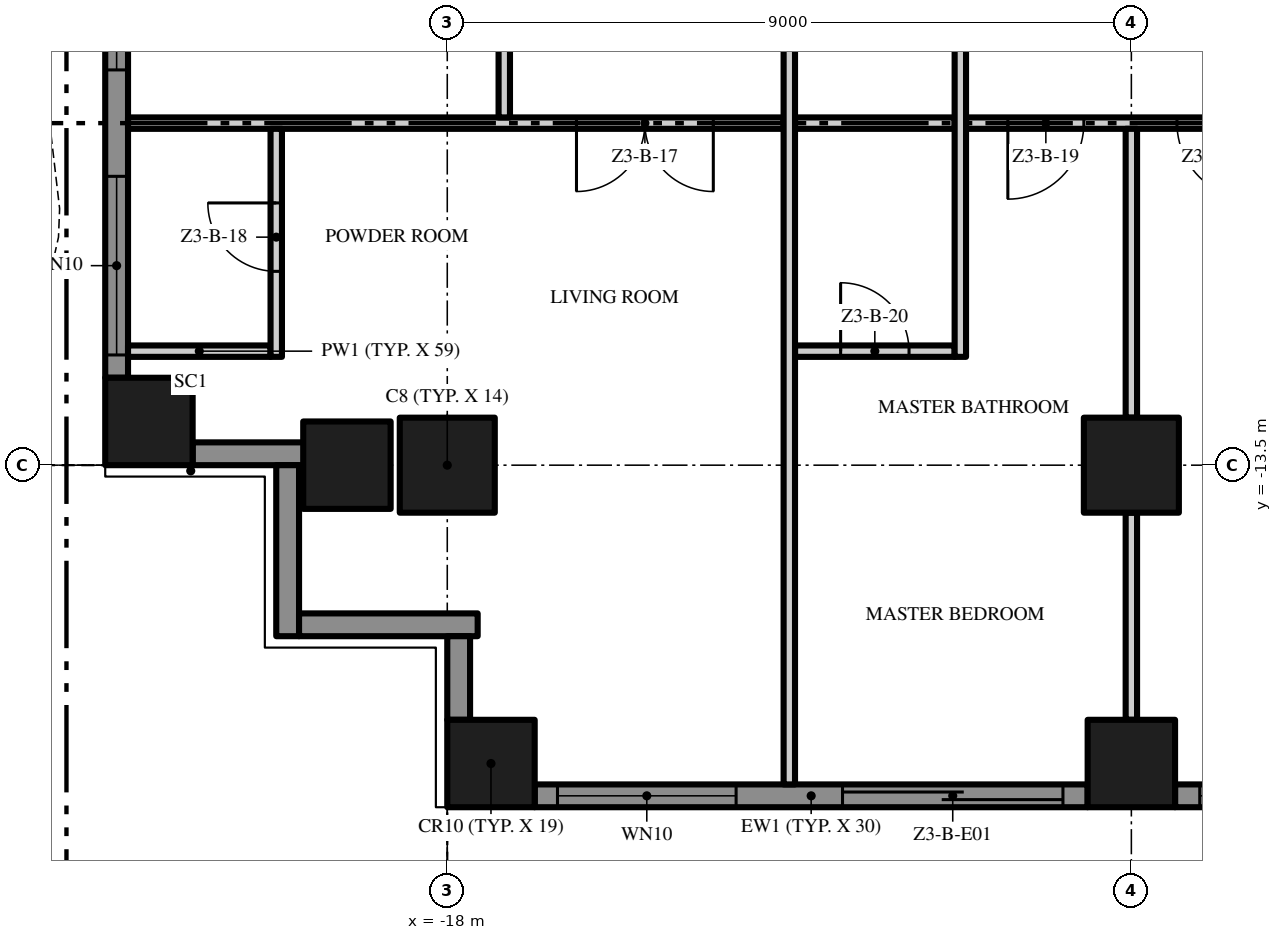
"""IFC4 building model, lengths in metres.
Left out: names, types, materials, properties, quantities, classifications, styles, units other than length and angle.
Written with IfcOpenShell. Run it as: python <this file> out.ifc"""

import sys

from ifc_helpers import new_model, si_unit, direction, frame, frame_2d, origin, origin_2d, place, context, subcontext, project, spatial, polyline, rectangle, outline, extrude, element, fill, save


model = new_model("IFC4")
c1 = context("Model", 3, precision=1e-05, world=origin(), true_north=direction((0.0, 1.0)))
c2 = subcontext(c1, "Body", "Model", "MODEL_VIEW")
j1 = project(units=[si_unit("LENGTHUNIT", "METRE"), si_unit("PLANEANGLEUNIT", "RADIAN")], contexts=[c1])
p1 = place(None, origin())
s1 = spatial("IfcSite", under=j1, at=p1, CompositionType="ELEMENT")
p2 = place(p1, origin())
s2 = spatial("IfcBuilding", under=s1, at=p2, CompositionType="ELEMENT")
p3 = place(p2, frame((0.0, 0.0, 140.2)))
s3 = spatial("IfcBuildingStorey", under=s2, at=p3, CompositionType="ELEMENT", Elevation=140.2)
p4 = place(p3, frame((-18.0, -13.5, 0.0), z_axis=(0.0, 0.0, 1.0), x_axis=(1.0, 0.0, 0.0)))
e1 = element("IfcColumn", 1, at=p4, inside=s3, PredefinedType="COLUMN", context=c2, shape_type="SweptSolid", body=[
    extrude(rectangle(XDim=1.25, YDim=1.25, at=origin_2d()), origin(), (0.0, 0.0, 1.0), 3.5),
])
for number, where, z_axis, x_axis in (
    (2, (-17.425, -17.425, 0.0), (0.0, 0.0, 1.0), (1.0, 0.0, 0.0)),
    (3, (-21.925, -12.925, 0.0), (0.0, 0.0, 1.0), (1.0, 0.0, 0.0)),
    (4, (-19.32, -13.5, 0.0), (0.0, 0.0, 1.0), (1.0, 0.0, 0.0)),
):
    element("IfcColumn", number, at=place(p3, frame(where, z_axis=z_axis, x_axis=x_axis)), inside=s3, PredefinedType="COLUMN", context=c2, shape_type="SweptSolid", body=[
        extrude(rectangle(XDim=1.15, YDim=1.15, at=origin_2d()), origin(), (0.0, 0.0, 1.0), 3.5),
    ])
p5 = place(p3, frame((-9.0, -13.5, 0.0), z_axis=(0.0, 0.0, 1.0), x_axis=(1.0, 0.0, 0.0)))
e5 = element("IfcColumn", 5, at=p5, inside=s3, PredefinedType="COLUMN", context=c2, shape_type="SweptSolid", body=[
    extrude(rectangle(XDim=1.25, YDim=1.25, at=origin_2d()), origin(), (0.0, 0.0, 1.0), 3.5),
])
p6 = place(p3, frame((-9.0, -17.425, 0.0), z_axis=(0.0, 0.0, 1.0), x_axis=(1.0, 0.0, 0.0)))
e6 = element("IfcColumn", 6, at=p6, inside=s3, PredefinedType="COLUMN", context=c2, shape_type="SweptSolid", body=[
    extrude(rectangle(XDim=1.15, YDim=1.15, at=origin_2d()), origin(), (0.0, 0.0, 1.0), 3.5),
])
p7 = place(p3, frame((-9.575, -17.85, 0.0), z_axis=(0.0, 0.0, 1.0), x_axis=(-1.0, 0.0, 0.0)))
e7 = element("IfcWall", 7, at=p7, inside=s3, PredefinedType="SOLIDWALL", context=c2, shape_type="SweptSolid", body=[
    extrude(rectangle(XDim=7.275, YDim=0.3, at=frame_2d((3.638, 0.0))), origin(), (0.0, 0.0, 1.0), 3.5),
])
p8 = place(p7, frame((4.625, 0.0, 0.45)))
e8 = element("IfcOpeningElement", 8, at=p8, cuts=e7, PredefinedType="OPENING", context=c2, shape_type="SweptSolid", body=[
    extrude(rectangle(XDim=2.35, YDim=2.65, at=frame_2d((1.175, 1.325))), frame((0.0, 0.16, 0.0), z_axis=(0.0, -1.0, 0.0), x_axis=(1.0, 0.0, 0.0)), (0.0, 0.0, 1.0), 0.32),
])
p9 = place(p7, frame((0.325, 0.0, 0.0)))
e9 = element("IfcOpeningElement", 9, at=p9, cuts=e7, PredefinedType="OPENING", context=c2, shape_type="SweptSolid", body=[
    extrude(rectangle(XDim=2.9, YDim=2.4, at=frame_2d((1.45, 1.2))), frame((0.0, 0.16, 0.0), z_axis=(0.0, -1.0, 0.0), x_axis=(1.0, 0.0, 0.0)), (0.0, 0.0, 1.0), 0.32),
])
p10 = place(p3, frame((-0.575, -17.85, 0.0), z_axis=(0.0, 0.0, 1.0), x_axis=(-1.0, 0.0, 0.0)))
e10 = element("IfcWall", 10, at=p10, inside=s3, PredefinedType="SOLIDWALL", context=c2, shape_type="SweptSolid", body=[
    extrude(rectangle(XDim=7.85, YDim=0.3, at=frame_2d((3.925, 0.0))), origin(), (0.0, 0.0, 1.0), 3.5),
])
p11 = place(p10, frame((4.625, 0.0, 0.45)))
e11 = element("IfcOpeningElement", 11, at=p11, cuts=e10, PredefinedType="OPENING", context=c2, shape_type="SweptSolid", body=[
    extrude(rectangle(XDim=2.9, YDim=2.65, at=frame_2d((1.45, 1.325))), frame((0.0, 0.16, 0.0), z_axis=(0.0, -1.0, 0.0), x_axis=(1.0, 0.0, 0.0)), (0.0, 0.0, 1.0), 0.32),
])
p12 = place(p10, frame((0.325, 0.0, 0.45)))
e12 = element("IfcOpeningElement", 12, at=p12, cuts=e10, PredefinedType="OPENING", context=c2, shape_type="SweptSolid", body=[
    extrude(rectangle(XDim=2.9, YDim=2.65, at=frame_2d((1.45, 1.325))), frame((0.0, 0.16, 0.0), z_axis=(0.0, -1.0, 0.0), x_axis=(1.0, 0.0, 0.0)), (0.0, 0.0, 1.0), 0.32),
])
p13 = place(p3, frame((-22.35, -12.35, 0.0), z_axis=(0.0, 0.0, 1.0), x_axis=(0.0, 1.0, 0.0)))
e13 = element("IfcWall", 13, at=p13, inside=s3, PredefinedType="SOLIDWALL", context=c2, shape_type="SweptSolid", body=[
    extrude(rectangle(XDim=7.275, YDim=0.3, at=frame_2d((3.638, 0.0))), origin(), (0.0, 0.0, 1.0), 3.5),
])
p14 = place(p13, frame((4.05, 0.0, 0.45)))
e14 = element("IfcOpeningElement", 14, at=p14, cuts=e13, PredefinedType="OPENING", context=c2, shape_type="SweptSolid", body=[
    extrude(rectangle(XDim=2.9, YDim=2.65, at=frame_2d((1.45, 1.325))), frame((0.0, 0.16, 0.0), z_axis=(0.0, -1.0, 0.0), x_axis=(1.0, 0.0, 0.0)), (0.0, 0.0, 1.0), 0.32),
])
p15 = place(p13, frame((0.3, 0.0, 0.45)))
e15 = element("IfcOpeningElement", 15, at=p15, cuts=e13, PredefinedType="OPENING", context=c2, shape_type="SweptSolid", body=[
    extrude(rectangle(XDim=2.35, YDim=2.65, at=frame_2d((1.175, 1.325))), frame((0.0, 0.16, 0.0), z_axis=(0.0, -1.0, 0.0), x_axis=(1.0, 0.0, 0.0)), (0.0, 0.0, 1.0), 0.32),
])
p16 = place(p3, frame((-19.85, -13.35, 0.0), z_axis=(0.0, 0.0, 1.0), x_axis=(-1.0, 0.0, 0.0)))
e16 = element("IfcWall", 16, at=p16, inside=s3, PredefinedType="SOLIDWALL", context=c2, shape_type="SweptSolid", body=[
    extrude(rectangle(XDim=1.5, YDim=0.3, at=frame_2d((0.75, 0.0))), origin(), (0.0, 0.0, 1.0), 3.5),
])
p17 = place(p3, frame((-20.1, -15.75, 0.0), z_axis=(0.0, 0.0, 1.0), x_axis=(0.0, 1.0, 0.0)))
e17 = element("IfcWall", 17, at=p17, inside=s3, PredefinedType="SOLIDWALL", context=c2, shape_type="SweptSolid", body=[
    extrude(rectangle(XDim=2.25, YDim=0.3, at=frame_2d((1.125, 0.0))), origin(), (0.0, 0.0, 1.0), 3.5),
])
p18 = place(p3, frame((-17.6, -15.6, 0.0), z_axis=(0.0, 0.0, 1.0), x_axis=(-1.0, 0.0, 0.0)))
e18 = element("IfcWall", 18, at=p18, inside=s3, PredefinedType="SOLIDWALL", context=c2, shape_type="SweptSolid", body=[
    extrude(rectangle(XDim=2.35, YDim=0.3, at=frame_2d((1.175, 0.0))), origin(), (0.0, 0.0, 1.0), 3.5),
])
p19 = place(p3, frame((-17.85, -16.85, 0.0), z_axis=(0.0, 0.0, 1.0), x_axis=(0.0, 1.0, 0.0)))
e19 = element("IfcWall", 19, at=p19, inside=s3, PredefinedType="SOLIDWALL", context=c2, shape_type="SweptSolid", body=[
    extrude(rectangle(XDim=1.1, YDim=0.3, at=frame_2d((0.55, 0.0))), origin(), (0.0, 0.0, 1.0), 3.5),
])
p20 = place(p3, origin())
e20 = element("IfcWall", 20, at=p20, inside=s3, PredefinedType="USERDEFINED", context=c2, shape_type="SweptSolid", body=[
    extrude(outline(polyline([(-18.0, -18.951), (-16.5, -19.612), (-15.0, -20.345), (-13.5, -20.869), (-12.375, -21.0), (-12.0, -20.985), (-10.5, -20.649), (-9.0, -19.988), (-7.5, -19.255), (-6.0, -18.731), (-4.875, -18.6), (-4.5, -18.615), (-3.0, -18.951), (-1.5, -19.612), (0.0, -20.345), (1.5, -20.869), (2.625, -21.0), (3.0, -20.985), (4.5, -20.649), (6.0, -19.988), (7.5, -19.255), (9.0, -18.731), (10.125, -18.6), (10.5, -18.615), (12.0, -18.951), (13.5, -19.612), (15.0, -20.345), (16.5, -20.869), (17.625, -21.0), (18.0, -20.985), (17.99, -20.735), (17.635, -20.749), (16.556, -20.624), (15.096, -20.114), (13.605, -19.385), (12.079, -18.713), (10.533, -18.366), (10.115, -18.349), (8.944, -18.486), (7.404, -19.024), (5.895, -19.761), (4.421, -20.41), (2.967, -20.736), (2.635, -20.749), (1.556, -20.624), (0.096, -20.114), (-1.395, -19.385), (-2.921, -18.713), (-4.467, -18.366), (-4.885, -18.349), (-6.056, -18.486), (-7.596, -19.024), (-9.105, -19.761), (-10.579, -20.41), (-12.033, -20.736), (-12.365, -20.749), (-13.444, -20.624), (-14.904, -20.114), (-16.395, -19.385), (-17.899, -18.723), (-18.0, -18.951)])), origin(), (0.0, 0.0, 1.0), 0.9),
])
p21 = place(p3, origin())
e21 = element("IfcWall", 21, at=p21, inside=s3, PredefinedType="USERDEFINED", context=c2, shape_type="SweptSolid", body=[
    extrude(outline(polyline([(-23.451, 18.0), (-24.112, 16.5), (-24.845, 15.0), (-25.369, 13.5), (-25.5, 12.375), (-25.485, 12.0), (-25.149, 10.5), (-24.488, 9.0), (-23.755, 7.5), (-23.231, 6.0), (-23.1, 4.875), (-23.115, 4.5), (-23.451, 3.0), (-24.112, 1.5), (-24.845, 0.0), (-25.369, -1.5), (-25.5, -2.625), (-25.485, -3.0), (-25.149, -4.5), (-24.488, -6.0), (-23.755, -7.5), (-23.231, -9.0), (-23.1, -10.125), (-23.115, -10.5), (-23.451, -12.0), (-24.112, -13.5), (-23.883, -13.601), (-23.213, -12.079), (-22.866, -10.533), (-22.849, -10.115), (-22.986, -8.944), (-23.524, -7.404), (-24.261, -5.895), (-24.91, -4.421), (-25.236, -2.967), (-25.249, -2.635), (-25.124, -1.556), (-24.614, -0.096), (-23.885, 1.395), (-23.213, 2.921), (-22.866, 4.467), (-22.849, 4.885), (-22.986, 6.056), (-23.524, 7.596), (-24.261, 9.105), (-24.91, 10.579), (-25.236, 12.033), (-25.249, 12.365), (-25.124, 13.444), (-24.614, 14.904), (-23.885, 16.395), (-23.223, 17.899), (-23.451, 18.0)])), origin(), (0.0, 0.0, 1.0), 0.9),
])
p22 = place(p3, frame((-22.2, -12.0, 0.0), z_axis=(0.0, 0.0, 1.0), x_axis=(1.0, 0.0, 0.0)))
e22 = element("IfcWall", 22, at=p22, inside=s3, PredefinedType="PARTITIONING", context=c2, shape_type="SweptSolid", body=[
    extrude(rectangle(XDim=1.875, YDim=0.15, at=frame_2d((0.938, 0.0))), origin(), (0.0, 0.0, 1.0), 3.5),
])
p23 = place(p3, frame((-13.425, -12.0, 0.0), z_axis=(0.0, 0.0, 1.0), x_axis=(1.0, 0.0, 0.0)))
e23 = element("IfcWall", 23, at=p23, inside=s3, PredefinedType="PARTITIONING", context=c2, shape_type="SweptSolid", body=[
    extrude(rectangle(XDim=2.1, YDim=0.15, at=frame_2d((1.05, 0.0))), origin(), (0.0, 0.0, 1.0), 3.5),
])
p24 = place(p23, frame((0.6, 0.0, 0.0)))
e24 = element("IfcOpeningElement", 24, at=p24, cuts=e23, PredefinedType="OPENING", context=c2, shape_type="SweptSolid", body=[
    extrude(rectangle(XDim=0.9, YDim=2.1, at=frame_2d((0.45, 1.05))), frame((0.0, 0.085, 0.0), z_axis=(0.0, -1.0, 0.0), x_axis=(1.0, 0.0, 0.0)), (0.0, 0.0, 1.0), 0.17),
])
p25 = place(p3, frame((-13.575, -9.0, 0.0), z_axis=(0.0, 0.0, 1.0), x_axis=(-1.0, 0.0, 0.0)))
e25 = element("IfcWall", 25, at=p25, inside=s3, PredefinedType="PARTITIONING", context=c2, shape_type="SweptSolid", body=[
    extrude(rectangle(XDim=8.625, YDim=0.15, at=frame_2d((4.312, 0.0))), origin(), (0.0, 0.0, 1.0), 3.5),
])
p26 = place(p25, frame((0.925, 0.0, 0.0)))
e26 = element("IfcOpeningElement", 26, at=p26, cuts=e25, PredefinedType="OPENING", context=c2, shape_type="SweptSolid", body=[
    extrude(rectangle(XDim=1.8, YDim=2.4, at=frame_2d((0.9, 1.2))), frame((0.0, 0.085, 0.0), z_axis=(0.0, -1.0, 0.0), x_axis=(1.0, 0.0, 0.0)), (0.0, 0.0, 1.0), 0.17),
])
p27 = place(p3, frame((-13.425, -9.0, 0.0), z_axis=(0.0, 0.0, 1.0), x_axis=(1.0, 0.0, 0.0)))
e27 = element("IfcWall", 27, at=p27, inside=s3, PredefinedType="PARTITIONING", context=c2, shape_type="SweptSolid", body=[
    extrude(rectangle(XDim=2.1, YDim=0.15, at=frame_2d((1.05, 0.0))), origin(), (0.0, 0.0, 1.0), 3.5),
])
p28 = place(p3, frame((-6.825, -9.0, 0.0), z_axis=(0.0, 0.0, 1.0), x_axis=(-1.0, 0.0, 0.0)))
e28 = element("IfcWall", 28, at=p28, inside=s3, PredefinedType="PARTITIONING", context=c2, shape_type="SweptSolid", body=[
    extrude(rectangle(XDim=4.35, YDim=0.15, at=frame_2d((2.175, 0.0))), origin(), (0.0, 0.0, 1.0), 3.5),
])
p29 = place(p28, frame((2.8, 0.0, 0.0)))
e29 = element("IfcOpeningElement", 29, at=p29, cuts=e28, PredefinedType="OPENING", context=c2, shape_type="SweptSolid", body=[
    extrude(rectangle(XDim=1.0, YDim=2.4, at=frame_2d((0.5, 1.2))), frame((0.0, 0.085, 0.0), z_axis=(0.0, -1.0, 0.0), x_axis=(1.0, 0.0, 0.0)), (0.0, 0.0, 1.0), 0.17),
])
p30 = place(p28, frame((0.575, 0.0, 0.0)))
e30 = element("IfcOpeningElement", 30, at=p30, cuts=e28, PredefinedType="OPENING", context=c2, shape_type="SweptSolid", body=[
    extrude(rectangle(XDim=1.0, YDim=2.4, at=frame_2d((0.5, 1.2))), frame((0.0, 0.085, 0.0), z_axis=(0.0, -1.0, 0.0), x_axis=(1.0, 0.0, 0.0)), (0.0, 0.0, 1.0), 0.17),
])
p31 = place(p3, frame((-20.25, -12.075, 0.0), z_axis=(0.0, 0.0, 1.0), x_axis=(0.0, 1.0, 0.0)))
e31 = element("IfcWall", 31, at=p31, inside=s3, PredefinedType="PARTITIONING", context=c2, shape_type="SweptSolid", body=[
    extrude(rectangle(XDim=3.0, YDim=0.15, at=frame_2d((1.5, 0.0))), origin(), (0.0, 0.0, 1.0), 3.5),
])
p32 = place(p31, frame((1.125, 0.0, 0.0)))
e32 = element("IfcOpeningElement", 32, at=p32, cuts=e31, PredefinedType="OPENING", context=c2, shape_type="SweptSolid", body=[
    extrude(rectangle(XDim=0.9, YDim=2.1, at=frame_2d((0.45, 1.05))), frame((0.0, 0.085, 0.0), z_axis=(0.0, -1.0, 0.0), x_axis=(1.0, 0.0, 0.0)), (0.0, 0.0, 1.0), 0.17),
])
p33 = place(p3, frame((-17.25, -8.925, 0.0), z_axis=(0.0, 0.0, 1.0), x_axis=(0.0, 1.0, 0.0)))
e33 = element("IfcWall", 33, at=p33, inside=s3, PredefinedType="PARTITIONING", context=c2, shape_type="SweptSolid", body=[
    extrude(rectangle(XDim=4.5, YDim=0.15, at=frame_2d((2.25, 0.0))), origin(), (0.0, 0.0, 1.0), 3.5),
])
p34 = place(p3, frame((-13.5, -4.425, 0.0), z_axis=(0.0, 0.0, 1.0), x_axis=(0.0, -1.0, 0.0)))
e34 = element("IfcWall", 34, at=p34, inside=s3, PredefinedType="PARTITIONING", context=c2, shape_type="SweptSolid", body=[
    extrude(rectangle(XDim=13.275, YDim=0.15, at=frame_2d((6.638, 0.0))), origin(), (0.0, 0.0, 1.0), 3.5),
])
p35 = place(p34, frame((1.875, 0.0, 0.0)))
e35 = element("IfcOpeningElement", 35, at=p35, cuts=e34, PredefinedType="OPENING", context=c2, shape_type="SweptSolid", body=[
    extrude(rectangle(XDim=0.9, YDim=2.1, at=frame_2d((0.45, 1.05))), frame((0.0, 0.085, 0.0), z_axis=(0.0, -1.0, 0.0), x_axis=(1.0, 0.0, 0.0)), (0.0, 0.0, 1.0), 0.17),
])
p36 = place(p3, frame((-11.25, -12.075, 0.0), z_axis=(0.0, 0.0, 1.0), x_axis=(0.0, 1.0, 0.0)))
e36 = element("IfcWall", 36, at=p36, inside=s3, PredefinedType="PARTITIONING", context=c2, shape_type="SweptSolid", body=[
    extrude(rectangle(XDim=7.65, YDim=0.15, at=frame_2d((3.825, 0.0))), origin(), (0.0, 0.0, 1.0), 3.5),
])
p37 = place(p3, frame((-9.0, -16.85, 0.0), z_axis=(0.0, 0.0, 1.0), x_axis=(0.0, 1.0, 0.0)))
e37 = element("IfcWall", 37, at=p37, inside=s3, PredefinedType="PARTITIONING", context=c2, shape_type="SweptSolid", body=[
    extrude(rectangle(XDim=2.725, YDim=0.15, at=frame_2d((1.363, 0.0))), origin(), (0.0, 0.0, 1.0), 3.5),
])
p38 = place(p3, frame((-9.0, -12.875, 0.0), z_axis=(0.0, 0.0, 1.0), x_axis=(0.0, 1.0, 0.0)))
e38 = element("IfcWall", 38, at=p38, inside=s3, PredefinedType="PARTITIONING", context=c2, shape_type="SweptSolid", body=[
    extrude(rectangle(XDim=3.8, YDim=0.15, at=frame_2d((1.9, 0.0))), origin(), (0.0, 0.0, 1.0), 3.5),
])
p39 = place(p8, origin())
e39 = element("IfcWindow", 39, at=p39, inside=s3, PartitioningType="SINGLE_PANEL", PredefinedType="WINDOW", context=c2, shape_type="SweptSolid", body=[
    extrude(rectangle(XDim=2.35, YDim=2.65, at=frame_2d((1.175, 1.325))), frame((0.0, 0.03, 0.0), z_axis=(0.0, -1.0, 0.0), x_axis=(1.0, 0.0, 0.0)), (0.0, 0.0, 1.0), 0.06),
])
fill(e8, e39)
p40 = place(p9, origin())
e40 = element("IfcDoor", 40, at=p40, inside=s3, OperationType="SINGLE_SWING_LEFT", PredefinedType="DOOR", context=c2, shape_type="SweptSolid", body=[
    extrude(rectangle(XDim=2.9, YDim=2.4, at=frame_2d((1.45, 1.2))), frame((0.0, 0.025, 0.0), z_axis=(0.0, -1.0, 0.0), x_axis=(1.0, 0.0, 0.0)), (0.0, 0.0, 1.0), 0.05),
])
fill(e9, e40)
p41 = place(p11, origin())
e41 = element("IfcWindow", 41, at=p41, inside=s3, PartitioningType="SINGLE_PANEL", PredefinedType="WINDOW", context=c2, shape_type="SweptSolid", body=[
    extrude(rectangle(XDim=2.9, YDim=2.65, at=frame_2d((1.45, 1.325))), frame((0.0, 0.03, 0.0), z_axis=(0.0, -1.0, 0.0), x_axis=(1.0, 0.0, 0.0)), (0.0, 0.0, 1.0), 0.06),
])
fill(e11, e41)
p42 = place(p14, origin())
e42 = element("IfcWindow", 42, at=p42, inside=s3, PartitioningType="SINGLE_PANEL", PredefinedType="WINDOW", context=c2, shape_type="SweptSolid", body=[
    extrude(rectangle(XDim=2.9, YDim=2.65, at=frame_2d((1.45, 1.325))), frame((0.0, 0.03, 0.0), z_axis=(0.0, -1.0, 0.0), x_axis=(1.0, 0.0, 0.0)), (0.0, 0.0, 1.0), 0.06),
])
fill(e14, e42)
p43 = place(p15, origin())
e43 = element("IfcWindow", 43, at=p43, inside=s3, PartitioningType="SINGLE_PANEL", PredefinedType="WINDOW", context=c2, shape_type="SweptSolid", body=[
    extrude(rectangle(XDim=2.35, YDim=2.65, at=frame_2d((1.175, 1.325))), frame((0.0, 0.03, 0.0), z_axis=(0.0, -1.0, 0.0), x_axis=(1.0, 0.0, 0.0)), (0.0, 0.0, 1.0), 0.06),
])
fill(e15, e43)
p44 = place(p26, origin())
e44 = element("IfcDoor", 44, at=p44, inside=s3, OperationType="DOUBLE_DOOR_SINGLE_SWING", PredefinedType="DOOR", context=c2, shape_type="SweptSolid", body=[
    extrude(rectangle(XDim=1.8, YDim=2.4, at=frame_2d((0.9, 1.2))), frame((0.0, 0.025, 0.0), z_axis=(0.0, -1.0, 0.0), x_axis=(1.0, 0.0, 0.0)), (0.0, 0.0, 1.0), 0.05),
])
fill(e26, e44)
p45 = place(p32, origin())
e45 = element("IfcDoor", 45, at=p45, inside=s3, OperationType="SINGLE_SWING_RIGHT", PredefinedType="DOOR", context=c2, shape_type="SweptSolid", body=[
    extrude(rectangle(XDim=0.9, YDim=2.1, at=frame_2d((0.45, 1.05))), frame((0.0, 0.025, 0.0), z_axis=(0.0, -1.0, 0.0), x_axis=(1.0, 0.0, 0.0)), (0.0, 0.0, 1.0), 0.05),
])
fill(e32, e45)
p46 = place(p29, origin())
e46 = element("IfcDoor", 46, at=p46, inside=s3, OperationType="SINGLE_SWING_RIGHT", PredefinedType="DOOR", context=c2, shape_type="SweptSolid", body=[
    extrude(rectangle(XDim=1.0, YDim=2.4, at=frame_2d((0.5, 1.2))), frame((0.0, 0.025, 0.0), z_axis=(0.0, -1.0, 0.0), x_axis=(1.0, 0.0, 0.0)), (0.0, 0.0, 1.0), 0.05),
])
fill(e29, e46)
p47 = place(p24, origin())
e47 = element("IfcDoor", 47, at=p47, inside=s3, OperationType="SINGLE_SWING_LEFT", PredefinedType="DOOR", context=c2, shape_type="SweptSolid", body=[
    extrude(rectangle(XDim=0.9, YDim=2.1, at=frame_2d((0.45, 1.05))), frame((0.0, 0.025, 0.0), z_axis=(0.0, -1.0, 0.0), x_axis=(1.0, 0.0, 0.0)), (0.0, 0.0, 1.0), 0.05),
])
fill(e24, e47)
p48 = place(p30, origin())
e48 = element("IfcDoor", 48, at=p48, inside=s3, OperationType="SINGLE_SWING_LEFT", PredefinedType="DOOR", context=c2, shape_type="SweptSolid", body=[
    extrude(rectangle(XDim=1.0, YDim=2.4, at=frame_2d((0.5, 1.2))), frame((0.0, 0.025, 0.0), z_axis=(0.0, -1.0, 0.0), x_axis=(1.0, 0.0, 0.0)), (0.0, 0.0, 1.0), 0.05),
])
fill(e30, e48)
save(model, sys.argv[1])
